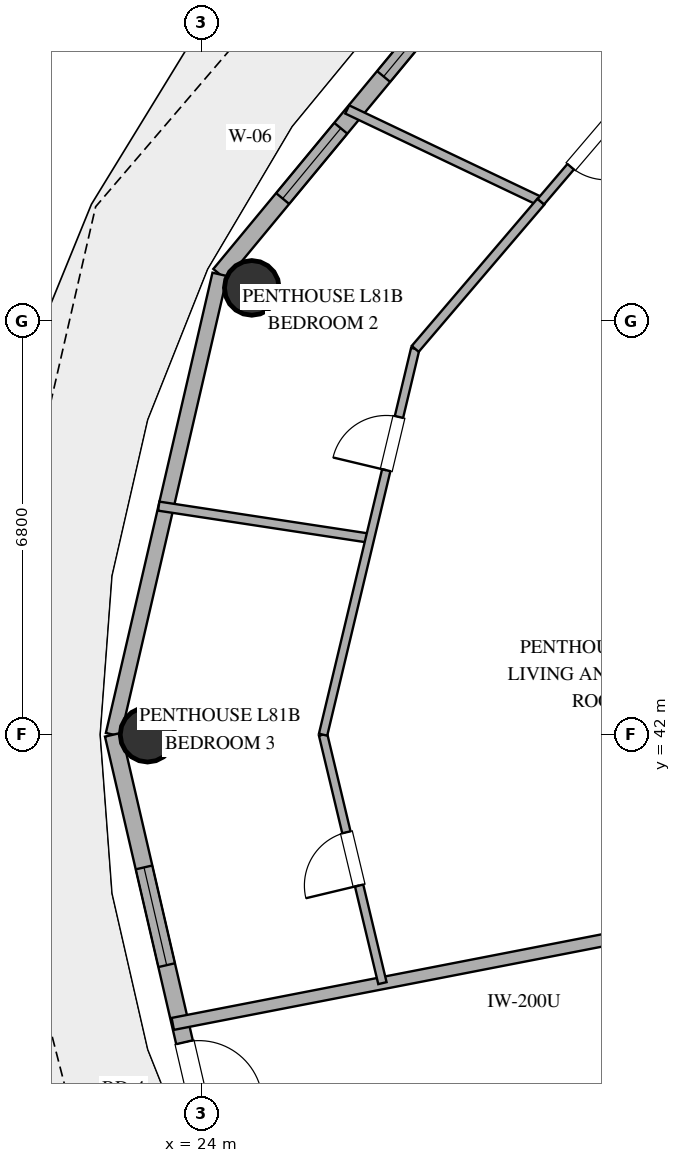
"""IFC4 building model, lengths in metres.
Left out: names, types, materials, properties, quantities, classifications, styles, units other than length and angle.
Written with IfcOpenShell. Run it as: python <this file> out.ifc"""

import sys

from ifc_helpers import new_model, si_unit, direction, frame, frame_2d, origin, origin_2d, place, context, subcontext, project, spatial, rectangle, hollow_circle, extrude, element, fill, save


model = new_model("IFC4")
c1 = context("Model", 3, precision=1e-05, world=origin(), true_north=direction((0.0, 1.0)))
c2 = subcontext(c1, "Body", "Model", "MODEL_VIEW")
j1 = project(units=[si_unit("LENGTHUNIT", "METRE"), si_unit("PLANEANGLEUNIT", "RADIAN")], contexts=[c1])
p1 = place(None, origin())
s1 = spatial("IfcSite", under=j1, at=p1, CompositionType="ELEMENT")
p2 = place(p1, origin())
s2 = spatial("IfcBuilding", under=s1, at=p2, CompositionType="ELEMENT")
p3 = place(p2, frame((0.0, 0.0, 312.6)))
s3 = spatial("IfcBuildingStorey", under=s2, at=p3, CompositionType="ELEMENT", Elevation=312.6)
for number, where, z_axis, x_axis in (
    (1, (24.831, 49.347, 0.0), (0.0, 0.0, 1.0), (1.0, 0.0, 0.0)),
    (2, (23.117, 42.0, 0.0), (0.0, 0.0, 1.0), (1.0, 0.0, 0.0)),
):
    element("IfcColumn", number, at=place(p3, frame(where, z_axis=z_axis, x_axis=x_axis)), inside=s3, PredefinedType="COLUMN", context=c2, shape_type="SweptSolid", body=[
        extrude(hollow_circle(Radius=0.45, WallThickness=0.025, at=origin_2d()), origin(), (0.0, 0.0, 1.0), 3.64),
    ])
p4 = place(p3, frame((29.617, 55.987, 0.0), z_axis=(0.0, 0.0, 1.0), x_axis=(-0.63761509934, -0.770355103243, 0.0)))
e3 = element("IfcWall", 3, at=p4, inside=s3, PredefinedType="SOLIDWALL", context=c2, shape_type="SweptSolid", body=[
    extrude(rectangle(XDim=8.33, YDim=0.28, at=frame_2d((4.165, 0.0))), origin(), (0.0, 0.0, 1.0), 3.64),
])
p5 = place(p4, frame((2.006, 0.0, 0.85)))
e4 = element("IfcOpeningElement", 4, at=p5, cuts=e3, PredefinedType="OPENING", context=c2, shape_type="SweptSolid", body=[
    extrude(rectangle(XDim=2.1, YDim=2.2, at=frame_2d((1.05, 1.1))), frame((0.0, 0.15, 0.0), z_axis=(0.0, -1.0, 0.0), x_axis=(1.0, 0.0, 0.0)), (0.0, 0.0, 1.0), 0.3),
])
p6 = place(p4, frame((5.211, 0.0, 0.85)))
e5 = element("IfcOpeningElement", 5, at=p6, cuts=e3, PredefinedType="OPENING", context=c2, shape_type="SweptSolid", body=[
    extrude(rectangle(XDim=1.5, YDim=2.0, at=frame_2d((0.75, 1.0))), frame((0.0, 0.15, 0.0), z_axis=(0.0, -1.0, 0.0), x_axis=(1.0, 0.0, 0.0)), (0.0, 0.0, 1.0), 0.3),
])
p7 = place(p3, frame((24.306, 49.57, 0.0), z_axis=(0.0, 0.0, 1.0), x_axis=(-0.225635078214, -0.974211892495, 0.0)))
e6 = element("IfcWall", 6, at=p7, inside=s3, PredefinedType="SOLIDWALL", context=c2, shape_type="SweptSolid", body=[
    extrude(rectangle(XDim=7.77, YDim=0.25, at=frame_2d((3.885, 0.0))), origin(), (0.0, 0.0, 1.0), 3.64),
])
p8 = place(p3, frame((22.553, 42.0, 0.0), z_axis=(0.0, 0.0, 1.0), x_axis=(0.225635078214, -0.974211892495, 0.0)))
e7 = element("IfcWall", 7, at=p8, inside=s3, PredefinedType="SOLIDWALL", context=c2, shape_type="SweptSolid", body=[
    extrude(rectangle(XDim=7.77, YDim=0.28, at=frame_2d((3.885, 0.0))), origin(), (0.0, 0.0, 1.0), 3.64),
])
p9 = place(p8, frame((2.241, 0.0, 0.85)))
e8 = element("IfcOpeningElement", 8, at=p9, cuts=e7, PredefinedType="OPENING", context=c2, shape_type="SweptSolid", body=[
    extrude(rectangle(XDim=1.65, YDim=2.0, at=frame_2d((0.825, 1.0))), frame((0.0, 0.15, 0.0), z_axis=(0.0, -1.0, 0.0), x_axis=(1.0, 0.0, 0.0)), (0.0, 0.0, 1.0), 0.3),
])
p10 = place(p8, frame((5.192, 0.0, 0.0)))
e9 = element("IfcOpeningElement", 9, at=p10, cuts=e7, PredefinedType="OPENING", context=c2, shape_type="SweptSolid", body=[
    extrude(rectangle(XDim=1.05, YDim=2.2, at=frame_2d((0.525, 1.1))), frame((0.0, 0.15, 0.0), z_axis=(0.0, -1.0, 0.0), x_axis=(1.0, 0.0, 0.0)), (0.0, 0.0, 1.0), 0.3),
])
p11 = place(p3, frame((34.8, 39.434, 0.0), z_axis=(0.0, 0.0, 1.0), x_axis=(-0.981626456647, -0.190812734402, 0.0)))
e10 = element("IfcWall", 10, at=p11, inside=s3, PredefinedType="PARTITIONING", context=c2, shape_type="SweptSolid", body=[
    extrude(rectangle(XDim=11.479, YDim=0.2, at=frame_2d((5.74, 0.0))), origin(), (0.0, 0.0, 1.0), 2.34),
])
p12 = place(p3, frame((26.979, 37.914, 0.0), z_axis=(0.0, 0.0, 1.0), x_axis=(-0.23229355625, 0.972645723645, 0.0)))
e11 = element("IfcWall", 11, at=p12, inside=s3, PredefinedType="PARTITIONING", context=c2, shape_type="SweptSolid", body=[
    extrude(rectangle(XDim=4.201, YDim=0.14, at=frame_2d((2.101, 0.0))), origin(), (0.0, 0.0, 1.0), 2.34),
])
p13 = place(p12, frame((1.65, 0.0, 0.0)))
e12 = element("IfcOpeningElement", 12, at=p13, cuts=e11, PredefinedType="OPENING", context=c2, shape_type="SweptSolid", body=[
    extrude(rectangle(XDim=0.9, YDim=2.1, at=frame_2d((0.45, 1.05))), frame((0.0, 0.08, 0.0), z_axis=(0.0, -1.0, 0.0), x_axis=(1.0, 0.0, 0.0)), (0.0, 0.0, 1.0), 0.16),
])
p14 = place(p3, frame((26.4, 52.282, 0.0), z_axis=(0.0, 0.0, 1.0), x_axis=(0.902924474477, -0.429799247777, 0.0)))
e13 = element("IfcWall", 13, at=p14, inside=s3, PredefinedType="PARTITIONING", context=c2, shape_type="SweptSolid", body=[
    extrude(rectangle(XDim=3.528, YDim=0.15, at=frame_2d((1.764, 0.0))), origin(), (0.0, 0.0, 1.0), 2.34),
])
p15 = place(p3, frame((26.775, 45.23, 0.0), z_axis=(0.0, 0.0, 1.0), x_axis=(-0.988623329482, 0.150412474232, 0.0)))
e14 = element("IfcWall", 14, at=p15, inside=s3, PredefinedType="PARTITIONING", context=c2, shape_type="SweptSolid", body=[
    extrude(rectangle(XDim=3.514, YDim=0.15, at=frame_2d((1.757, 0.0))), origin(), (0.0, 0.0, 1.0), 2.34),
])
p16 = place(p3, frame((26.004, 42.0, 0.0), z_axis=(0.0, 0.0, 1.0), x_axis=(0.232298462197, 0.972644551962, 0.0)))
e15 = element("IfcWall", 15, at=p16, inside=s3, PredefinedType="PARTITIONING", context=c2, shape_type="SweptSolid", body=[
    extrude(rectangle(XDim=6.523, YDim=0.14, at=frame_2d((3.262, 0.0))), origin(), (0.0, 0.0, 1.0), 2.34),
])
p17 = place(p16, frame((4.472, 0.0, 0.0)))
e16 = element("IfcOpeningElement", 16, at=p17, cuts=e15, PredefinedType="OPENING", context=c2, shape_type="SweptSolid", body=[
    extrude(rectangle(XDim=0.9, YDim=2.1, at=frame_2d((0.45, 1.05))), frame((0.0, 0.08, 0.0), z_axis=(0.0, -1.0, 0.0), x_axis=(1.0, 0.0, 0.0)), (0.0, 0.0, 1.0), 0.16),
])
p18 = place(p3, frame((29.585, 50.766, 0.0), z_axis=(0.0, 0.0, 1.0), x_axis=(-0.649223419945, -0.760597759, 0.0)))
e17 = element("IfcWall", 17, at=p18, inside=s3, PredefinedType="PARTITIONING", context=c2, shape_type="SweptSolid", body=[
    extrude(rectangle(XDim=3.183, YDim=0.15, at=frame_2d((1.591, 0.0))), origin(), (0.0, 0.0, 1.0), 2.34),
])
p19 = place(p3, frame((31.15, 52.599, 0.0), z_axis=(0.0, 0.0, 1.0), x_axis=(-0.649188051026, -0.760627947426, 0.0)))
e18 = element("IfcWall", 18, at=p19, inside=s3, PredefinedType="PARTITIONING", context=c2, shape_type="SweptSolid", body=[
    extrude(rectangle(XDim=2.41, YDim=0.14, at=frame_2d((1.205, 0.0))), origin(), (0.0, 0.0, 1.0), 2.34),
])
p20 = place(p19, frame((0.755, 0.0, 0.0)))
e19 = element("IfcOpeningElement", 19, at=p20, cuts=e18, PredefinedType="OPENING", context=c2, shape_type="SweptSolid", body=[
    extrude(rectangle(XDim=0.9, YDim=2.1, at=frame_2d((0.45, 1.05))), frame((0.0, 0.08, 0.0), z_axis=(0.0, -1.0, 0.0), x_axis=(1.0, 0.0, 0.0)), (0.0, 0.0, 1.0), 0.16),
])
p21 = place(p5, origin())
e20 = element("IfcWindow", 20, at=p21, inside=s3, PartitioningType="SINGLE_PANEL", PredefinedType="WINDOW", context=c2, shape_type="SweptSolid", body=[
    extrude(rectangle(XDim=2.1, YDim=2.2, at=frame_2d((1.05, 1.1))), frame((0.0, 0.03, 0.0), z_axis=(0.0, -1.0, 0.0), x_axis=(1.0, 0.0, 0.0)), (0.0, 0.0, 1.0), 0.06),
])
fill(e4, e20)
p22 = place(p6, origin())
e21 = element("IfcWindow", 21, at=p22, inside=s3, PartitioningType="SINGLE_PANEL", PredefinedType="WINDOW", context=c2, shape_type="SweptSolid", body=[
    extrude(rectangle(XDim=1.5, YDim=2.0, at=frame_2d((0.75, 1.0))), frame((0.0, 0.03, 0.0), z_axis=(0.0, -1.0, 0.0), x_axis=(1.0, 0.0, 0.0)), (0.0, 0.0, 1.0), 0.06),
])
fill(e5, e21)
p23 = place(p9, origin())
e22 = element("IfcWindow", 22, at=p23, inside=s3, PartitioningType="SINGLE_PANEL", PredefinedType="WINDOW", context=c2, shape_type="SweptSolid", body=[
    extrude(rectangle(XDim=1.65, YDim=2.0, at=frame_2d((0.825, 1.0))), frame((0.0, 0.03, 0.0), z_axis=(0.0, -1.0, 0.0), x_axis=(1.0, 0.0, 0.0)), (0.0, 0.0, 1.0), 0.06),
])
fill(e8, e22)
p24 = place(p10, origin())
e23 = element("IfcDoor", 23, at=p24, inside=s3, OperationType="SINGLE_SWING_RIGHT", PredefinedType="DOOR", context=c2, shape_type="SweptSolid", body=[
    extrude(rectangle(XDim=1.05, YDim=2.2, at=frame_2d((0.525, 1.1))), frame((0.0, 0.025, 0.0), z_axis=(0.0, -1.0, 0.0), x_axis=(1.0, 0.0, 0.0)), (0.0, 0.0, 1.0), 0.05),
])
fill(e9, e23)
p25 = place(p13, origin())
e24 = element("IfcDoor", 24, at=p25, inside=s3, OperationType="SINGLE_SWING_LEFT", PredefinedType="DOOR", context=c2, shape_type="SweptSolid", body=[
    extrude(rectangle(XDim=0.9, YDim=2.1, at=frame_2d((0.45, 1.05))), frame((0.0, 0.025, 0.0), z_axis=(0.0, -1.0, 0.0), x_axis=(1.0, 0.0, 0.0)), (0.0, 0.0, 1.0), 0.05),
])
fill(e12, e24)
p26 = place(p17, origin())
e25 = element("IfcDoor", 25, at=p26, inside=s3, OperationType="SINGLE_SWING_LEFT", PredefinedType="DOOR", context=c2, shape_type="SweptSolid", body=[
    extrude(rectangle(XDim=0.9, YDim=2.1, at=frame_2d((0.45, 1.05))), frame((0.0, 0.025, 0.0), z_axis=(0.0, -1.0, 0.0), x_axis=(1.0, 0.0, 0.0)), (0.0, 0.0, 1.0), 0.05),
])
fill(e16, e25)
p27 = place(p20, origin())
e26 = element("IfcDoor", 26, at=p27, inside=s3, OperationType="SINGLE_SWING_LEFT", PredefinedType="DOOR", context=c2, shape_type="SweptSolid", body=[
    extrude(rectangle(XDim=0.9, YDim=2.1, at=frame_2d((0.45, 1.05))), frame((0.0, 0.025, 0.0), z_axis=(0.0, -1.0, 0.0), x_axis=(1.0, 0.0, 0.0)), (0.0, 0.0, 1.0), 0.05),
])
fill(e19, e26)
save(model, sys.argv[1])
